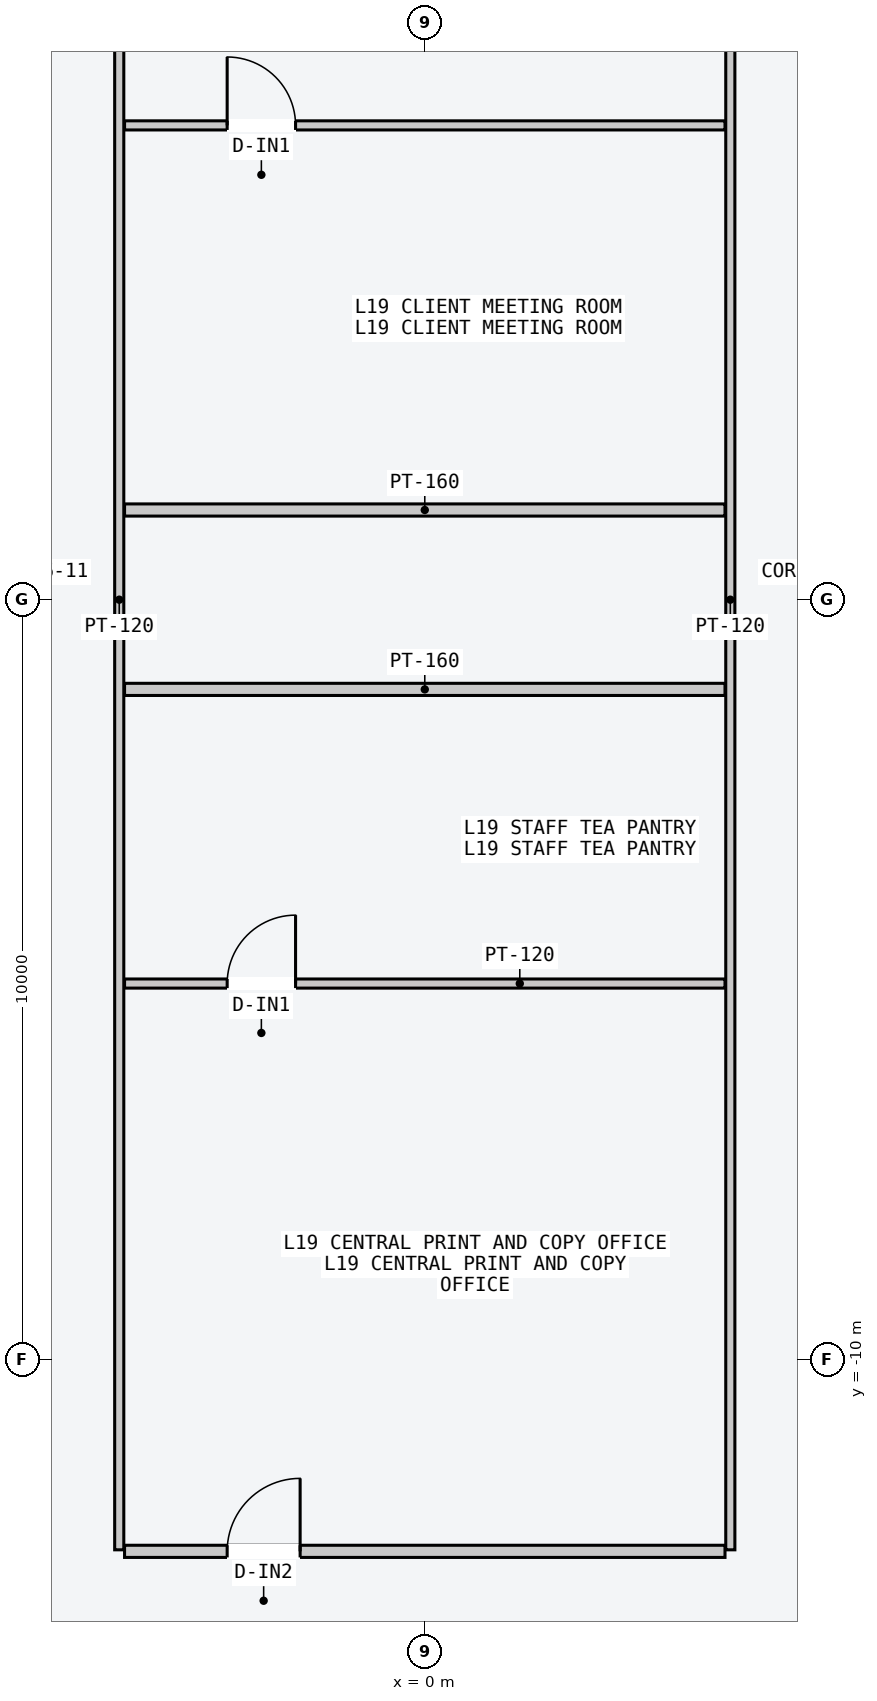
"""IFC4 building model, lengths in metres.
Left out: names, types, materials, properties, quantities, classifications, styles, units other than length and angle.
Written with IfcOpenShell. Run it as: python <this file> out.ifc"""

import sys

from ifc_helpers import new_model, si_unit, direction, frame, frame_2d, origin, place, context, subcontext, project, spatial, rectangle, extrude, element, fill, save


model = new_model("IFC4")
c1 = context("Model", 3, precision=1e-05, world=origin(), true_north=direction((0.0, 1.0)))
c2 = subcontext(c1, "Body", "Model", "MODEL_VIEW")
j1 = project(units=[si_unit("LENGTHUNIT", "METRE"), si_unit("PLANEANGLEUNIT", "RADIAN")], contexts=[c1])
p1 = place(None, origin())
s1 = spatial("IfcSite", under=j1, at=p1, CompositionType="ELEMENT")
p2 = place(p1, origin())
s2 = spatial("IfcBuilding", under=s1, at=p2, CompositionType="ELEMENT")
p3 = place(p2, frame((0.0, 0.0, 74.4)))
s3 = spatial("IfcBuildingStorey", under=s2, at=p3, CompositionType="ELEMENT", Elevation=74.4)
for number, where, z_axis, x_axis in (
    (1, (-4.02, -12.5, 0.0), (0.0, 0.0, 1.0), (0.0, 1.0, 0.0)),
    (2, (4.02, -12.5, 0.0), (0.0, 0.0, 1.0), (0.0, 1.0, 0.0)),
):
    element("IfcWall", number, at=place(p3, frame(where, z_axis=z_axis, x_axis=x_axis)), inside=s3, PredefinedType="PARTITIONING", context=c2, shape_type="SweptSolid", body=[
        extrude(rectangle(XDim=25.0, YDim=0.12, at=frame_2d((12.5, 0.0))), origin(), (0.0, 0.0, 1.0), 3.4),
    ])
for number, where, z_axis, x_axis in (
    (3, (-3.95, 1.18, 0.0), (0.0, 0.0, 1.0), (1.0, 0.0, 0.0)),
    (4, (-3.95, -1.18, 0.0), (0.0, 0.0, 1.0), (1.0, 0.0, 0.0)),
):
    element("IfcWall", number, at=place(p3, frame(where, z_axis=z_axis, x_axis=x_axis)), inside=s3, PredefinedType="PARTITIONING", context=c2, shape_type="SweptSolid", body=[
        extrude(rectangle(XDim=7.9, YDim=0.16, at=frame_2d((3.95, 0.0))), origin(), (0.0, 0.0, 1.0), 3.4),
    ])
p4 = place(p3, frame((-3.95, -12.52, 0.0), z_axis=(0.0, 0.0, 1.0), x_axis=(1.0, 0.0, 0.0)))
e5 = element("IfcWall", 5, at=p4, inside=s3, PredefinedType="PARTITIONING", context=c2, shape_type="SweptSolid", body=[
    extrude(rectangle(XDim=7.9, YDim=0.16, at=frame_2d((3.95, 0.0))), origin(), (0.0, 0.0, 1.0), 3.4),
])
p5 = place(p4, frame((1.35, 0.0, 0.0)))
e6 = element("IfcOpeningElement", 6, at=p5, cuts=e5, PredefinedType="OPENING", context=c2, shape_type="SweptSolid", body=[
    extrude(rectangle(XDim=0.96, YDim=2.18, at=frame_2d((0.48, 1.09))), frame((0.0, 0.09, 0.0), z_axis=(0.0, -1.0, 0.0), x_axis=(1.0, 0.0, 0.0)), (0.0, 0.0, 1.0), 0.18),
])
p6 = place(p3, frame((-3.95, 6.24, 0.0), z_axis=(0.0, 0.0, 1.0), x_axis=(1.0, 0.0, 0.0)))
e7 = element("IfcWall", 7, at=p6, inside=s3, PredefinedType="PARTITIONING", context=c2, shape_type="SweptSolid", body=[
    extrude(rectangle(XDim=7.9, YDim=0.12, at=frame_2d((3.95, 0.0))), origin(), (0.0, 0.0, 1.0), 3.4),
])
p7 = place(p6, frame((1.35, 0.0, 0.0)))
e8 = element("IfcOpeningElement", 8, at=p7, cuts=e7, PredefinedType="OPENING", context=c2, shape_type="SweptSolid", body=[
    extrude(rectangle(XDim=0.9, YDim=2.15, at=frame_2d((0.45, 1.075))), frame((0.0, 0.07, 0.0), z_axis=(0.0, -1.0, 0.0), x_axis=(1.0, 0.0, 0.0)), (0.0, 0.0, 1.0), 0.14),
])
p8 = place(p3, frame((-3.95, -5.05, 0.0), z_axis=(0.0, 0.0, 1.0), x_axis=(1.0, 0.0, 0.0)))
e9 = element("IfcWall", 9, at=p8, inside=s3, PredefinedType="PARTITIONING", context=c2, shape_type="SweptSolid", body=[
    extrude(rectangle(XDim=7.9, YDim=0.12, at=frame_2d((3.95, 0.0))), origin(), (0.0, 0.0, 1.0), 3.4),
])
p9 = place(p8, frame((1.35, 0.0, 0.0)))
e10 = element("IfcOpeningElement", 10, at=p9, cuts=e9, PredefinedType="OPENING", context=c2, shape_type="SweptSolid", body=[
    extrude(rectangle(XDim=0.9, YDim=2.15, at=frame_2d((0.45, 1.075))), frame((0.0, 0.07, 0.0), z_axis=(0.0, -1.0, 0.0), x_axis=(1.0, 0.0, 0.0)), (0.0, 0.0, 1.0), 0.14),
])
p10 = place(p5, origin())
e11 = element("IfcDoor", 11, at=p10, inside=s3, OperationType="SINGLE_SWING_RIGHT", PredefinedType="DOOR", context=c2, shape_type="SweptSolid", body=[
    extrude(rectangle(XDim=0.96, YDim=2.18, at=frame_2d((0.48, 1.09))), frame((0.0, 0.025, 0.0), z_axis=(0.0, -1.0, 0.0), x_axis=(1.0, 0.0, 0.0)), (0.0, 0.0, 1.0), 0.05),
])
fill(e6, e11)
p11 = place(p7, origin())
e12 = element("IfcDoor", 12, at=p11, inside=s3, OperationType="SINGLE_SWING_LEFT", PredefinedType="DOOR", context=c2, shape_type="SweptSolid", body=[
    extrude(rectangle(XDim=0.9, YDim=2.15, at=frame_2d((0.45, 1.075))), frame((0.0, 0.025, 0.0), z_axis=(0.0, -1.0, 0.0), x_axis=(1.0, 0.0, 0.0)), (0.0, 0.0, 1.0), 0.05),
])
fill(e8, e12)
p12 = place(p9, origin())
e13 = element("IfcDoor", 13, at=p12, inside=s3, OperationType="SINGLE_SWING_RIGHT", PredefinedType="DOOR", context=c2, shape_type="SweptSolid", body=[
    extrude(rectangle(XDim=0.9, YDim=2.15, at=frame_2d((0.45, 1.075))), frame((0.0, 0.025, 0.0), z_axis=(0.0, -1.0, 0.0), x_axis=(1.0, 0.0, 0.0)), (0.0, 0.0, 1.0), 0.05),
])
fill(e10, e13)
save(model, sys.argv[1])
